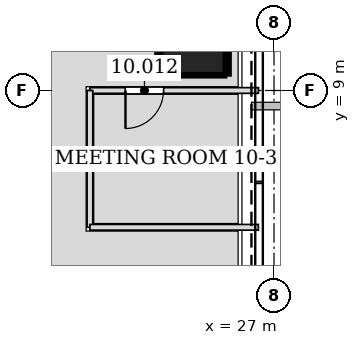
"""IFC4 building model, lengths in metres.
Left out: names, types, materials, properties, quantities, classifications, styles, units other than length and angle.
Written with IfcOpenShell. Run it as: python <this file> out.ifc"""

import sys

from ifc_helpers import new_model, si_unit, direction, frame, frame_2d, origin, origin_2d, place, context, subcontext, project, spatial, rectangle, hollow_rectangle, extrude, element, fill, save


model = new_model("IFC4")
c1 = context("Model", 3, precision=1e-05, world=origin(), true_north=direction((0.0, 1.0)))
c2 = subcontext(c1, "Body", "Model", "MODEL_VIEW")
j1 = project(units=[si_unit("LENGTHUNIT", "METRE"), si_unit("PLANEANGLEUNIT", "RADIAN")], contexts=[c1])
p1 = place(None, origin())
s1 = spatial("IfcSite", under=j1, at=p1, CompositionType="ELEMENT")
p2 = place(p1, origin())
s2 = spatial("IfcBuilding", under=s1, at=p2, CompositionType="ELEMENT")
p3 = place(p2, frame((0.0, 0.0, 49.8)))
s3 = spatial("IfcBuildingStorey", under=s2, at=p3, CompositionType="ELEMENT", Elevation=49.8)
p4 = place(p3, frame((24.928, 10.325, 0.0), z_axis=(-0.028295730207, -0.011736627314, 0.99953069149), x_axis=(0.383133442967, -0.923693003589, 0.0)))
e1 = element("IfcColumn", 1, at=p4, inside=s3, PredefinedType="COLUMN", context=c2, shape_type="SweptSolid", body=[
    extrude(hollow_rectangle(XDim=1.8, YDim=1.8, WallThickness=0.085, at=origin_2d()), origin(), (0.0, 0.0, 1.0), 4.202),
])
p5 = place(p3, frame((26.59, 9.0, 0.0), z_axis=(0.0, 0.0, 1.0), x_axis=(-1.0, 0.0, 0.0)))
e2 = element("IfcWall", 2, at=p5, inside=s3, PredefinedType="PARTITIONING", context=c2, shape_type="SweptSolid", body=[
    extrude(rectangle(XDim=4.434, YDim=0.15, at=frame_2d((2.217, 0.0))), origin(), (0.0, 0.0, 1.0), 3.418),
])
p6 = place(p5, frame((2.499, 0.0, 0.0)))
e3 = element("IfcOpeningElement", 3, at=p6, cuts=e2, PredefinedType="OPENING", context=c2, shape_type="SweptSolid", body=[
    extrude(rectangle(XDim=1.0, YDim=2.1, at=frame_2d((0.5, 1.05))), frame((0.0, 0.085, 0.0), z_axis=(0.0, -1.0, 0.0), x_axis=(1.0, 0.0, 0.0)), (0.0, 0.0, 1.0), 0.17),
])
p7 = place(p3, frame((22.156, 9.0, 0.0), z_axis=(0.0, 0.0, 1.0), x_axis=(0.0, -1.0, 0.0)))
e4 = element("IfcWall", 4, at=p7, inside=s3, PredefinedType="PARTITIONING", context=c2, shape_type="SweptSolid", body=[
    extrude(rectangle(XDim=3.6, YDim=0.15, at=frame_2d((1.8, 0.0))), origin(), (0.0, 0.0, 1.0), 4.035),
])
p8 = place(p3, frame((22.156, 5.4, 0.0), z_axis=(0.0, 0.0, 1.0), x_axis=(1.0, 0.0, 0.0)))
e5 = element("IfcWall", 5, at=p8, inside=s3, PredefinedType="PARTITIONING", context=c2, shape_type="SweptSolid", body=[
    extrude(rectangle(XDim=4.432, YDim=0.15, at=frame_2d((2.216, 0.0))), origin(), (0.0, 0.0, 1.0), 3.418),
])
p9 = place(p6, origin())
e6 = element("IfcDoor", 6, at=p9, inside=s3, OperationType="SINGLE_SWING_RIGHT", PredefinedType="DOOR", context=c2, shape_type="SweptSolid", body=[
    extrude(rectangle(XDim=1.0, YDim=2.1, at=frame_2d((0.5, 1.05))), frame((0.0, 0.025, 0.0), z_axis=(0.0, -1.0, 0.0), x_axis=(1.0, 0.0, 0.0)), (0.0, 0.0, 1.0), 0.05),
])
fill(e3, e6)
save(model, sys.argv[1])
